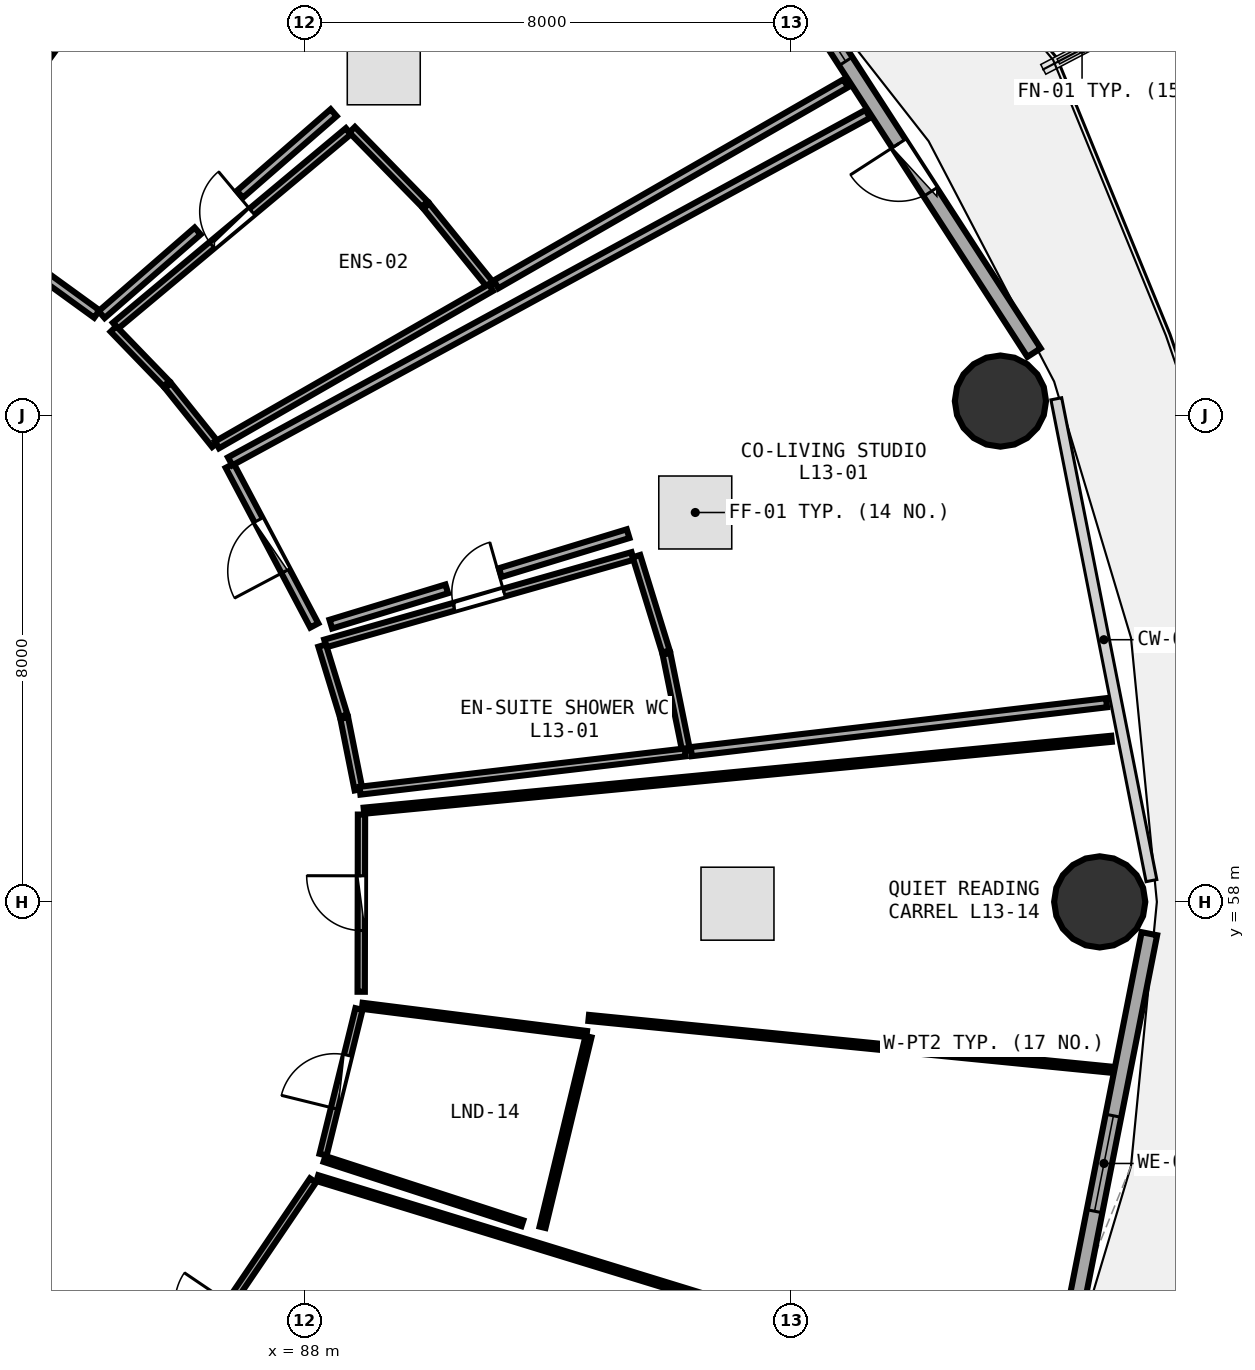
"""IFC4 building model, lengths in metres.
Left out: names, types, materials, properties, quantities, classifications, styles, units other than length and angle.
Written with IfcOpenShell. Run it as: python <this file> out.ifc"""

import sys

from ifc_helpers import new_model, si_unit, direction, frame, frame_2d, origin, origin_2d, place, context, subcontext, project, spatial, rectangle, circle, extrude, element, fill, save


model = new_model("IFC4")
c1 = context("Model", 3, precision=1e-05, world=origin(), true_north=direction((0.0, 1.0)))
c2 = subcontext(c1, "Body", "Model", "MODEL_VIEW")
j1 = project(units=[si_unit("LENGTHUNIT", "METRE"), si_unit("PLANEANGLEUNIT", "RADIAN")], contexts=[c1])
p1 = place(None, origin())
s1 = spatial("IfcSite", under=j1, at=p1, CompositionType="ELEMENT")
p2 = place(p1, origin())
s2 = spatial("IfcBuilding", under=s1, at=p2, CompositionType="ELEMENT")
p3 = place(p2, frame((0.0, 0.0, 52.5)))
s3 = spatial("IfcBuildingStorey", under=s2, at=p3, CompositionType="ELEMENT", Elevation=52.5)
for number, where, z_axis, x_axis in (
    (1, (101.08, 58.0, 0.0), (0.0, 0.0, 1.0), (1.0, 0.0, 0.0)),
    (2, (99.447, 66.236, 0.0), (0.0, 0.0, 1.0), (1.0, 0.0, 0.0)),
):
    element("IfcColumn", number, at=place(p3, frame(where, z_axis=z_axis, x_axis=x_axis)), inside=s3, PredefinedType="COLUMN", context=c2, shape_type="SweptSolid", body=[
        extrude(circle(Radius=0.75, at=origin_2d()), origin(), (0.0, 0.0, 1.0), 3.75),
    ])
p4 = place(p3, frame((99.999, 67.033, 0.0), z_axis=(0.0, 0.0, 1.0), x_axis=(-0.543005114258, 0.839729388488, 0.0)))
e3 = element("IfcWall", 3, at=p4, inside=s3, PredefinedType="SOLIDWALL", context=c2, shape_type="SweptSolid", body=[
    extrude(rectangle(XDim=7.938, YDim=0.26, at=frame_2d((3.969, 0.0))), origin(), (0.0, 0.0, 1.0), 3.475),
])
p5 = place(p4, frame((3.144, 0.0, 0.0)))
e4 = element("IfcOpeningElement", 4, at=p5, cuts=e3, PredefinedType="OPENING", context=c2, shape_type="SweptSolid", body=[
    extrude(rectangle(XDim=0.95, YDim=2.1, at=frame_2d((0.475, 1.05))), frame((0.0, 0.14, 0.0), z_axis=(0.0, -1.0, 0.0), x_axis=(1.0, 0.0, 0.0)), (0.0, 0.0, 1.0), 0.28),
])
p6 = place(p4, frame((5.704, 0.0, 0.85)))
e5 = element("IfcOpeningElement", 5, at=p6, cuts=e3, PredefinedType="OPENING", context=c2, shape_type="SweptSolid", body=[
    extrude(rectangle(XDim=1.2, YDim=1.45, at=frame_2d((0.6, 0.725))), frame((0.0, 0.14, 0.0), z_axis=(0.0, -1.0, 0.0), x_axis=(1.0, 0.0, 0.0)), (0.0, 0.0, 1.0), 0.28),
])
p7 = place(p3, frame((100.404, 49.92, 0.0), z_axis=(0.0, 0.0, 1.0), x_axis=(0.193726159581, 0.98105564322, 0.0)))
e6 = element("IfcWall", 6, at=p7, inside=s3, PredefinedType="SOLIDWALL", context=c2, shape_type="SweptSolid", body=[
    extrude(rectangle(XDim=7.703, YDim=0.26, at=frame_2d((3.851, 0.0))), origin(), (0.0, 0.0, 1.0), 3.475),
])
p8 = place(p7, frame((3.051, 0.0, 0.85)))
e7 = element("IfcOpeningElement", 7, at=p8, cuts=e6, PredefinedType="OPENING", context=c2, shape_type="SweptSolid", body=[
    extrude(rectangle(XDim=1.6, YDim=1.45, at=frame_2d((0.8, 0.725))), frame((0.0, 0.14, 0.0), z_axis=(0.0, -1.0, 0.0), x_axis=(1.0, 0.0, 0.0)), (0.0, 0.0, 1.0), 0.28),
])
p9 = place(p3, frame((88.344, 62.25, 0.0), z_axis=(0.0, 0.0, 1.0), x_axis=(0.961805744602, 0.273732916636, 0.0)))
e8 = element("IfcWall", 8, at=p9, inside=s3, PredefinedType="PLUMBINGWALL", context=c2, shape_type="SweptSolid", body=[
    extrude(rectangle(XDim=5.254, YDim=0.13, at=frame_2d((2.627, 0.0))), origin(), (0.0, 0.0, 1.0), 3.175),
])
p10 = place(p9, frame((2.197, 0.0, 0.0)))
e9 = element("IfcOpeningElement", 9, at=p10, cuts=e8, PredefinedType="OPENING", context=c2, shape_type="SweptSolid", body=[
    extrude(rectangle(XDim=0.86, YDim=2.05, at=frame_2d((0.43, 1.025))), frame((0.0, 0.075, 0.0), z_axis=(0.0, -1.0, 0.0), x_axis=(1.0, 0.0, 0.0)), (0.0, 0.0, 1.0), 0.15),
])
p11 = place(p3, frame((88.162, 62.546, 0.0), z_axis=(0.0, 0.0, 1.0), x_axis=(-0.467566881753, 0.883957697567, 0.0)))
e10 = element("IfcWall", 10, at=p11, inside=s3, PredefinedType="PARTITIONING", context=c2, shape_type="SweptSolid", body=[
    extrude(rectangle(XDim=2.972, YDim=0.15, at=frame_2d((1.486, 0.0))), origin(), (0.0, 0.0, 1.0), 2.875),
])
p12 = place(p11, frame((1.011, 0.0, 0.0)))
e11 = element("IfcOpeningElement", 11, at=p12, cuts=e10, PredefinedType="OPENING", context=c2, shape_type="SweptSolid", body=[
    extrude(rectangle(XDim=0.95, YDim=2.08, at=frame_2d((0.475, 1.04))), frame((0.0, 0.085, 0.0), z_axis=(0.0, -1.0, 0.0), x_axis=(1.0, 0.0, 0.0)), (0.0, 0.0, 1.0), 0.17),
])
p13 = place(p3, frame((84.892, 67.475, 0.0), z_axis=(0.0, 0.0, 1.0), x_axis=(0.767551433238, 0.64098736129, 0.0)))
e12 = element("IfcWall", 12, at=p13, inside=s3, PredefinedType="PLUMBINGWALL", context=c2, shape_type="SweptSolid", body=[
    extrude(rectangle(XDim=4.992, YDim=0.13, at=frame_2d((2.496, 0.0))), origin(), (0.0, 0.0, 1.0), 3.175),
])
p14 = place(p13, frame((2.066, 0.0, 0.0)))
e13 = element("IfcOpeningElement", 13, at=p14, cuts=e12, PredefinedType="OPENING", context=c2, shape_type="SweptSolid", body=[
    extrude(rectangle(XDim=0.86, YDim=2.05, at=frame_2d((0.43, 1.025))), frame((0.0, 0.075, 0.0), z_axis=(0.0, -1.0, 0.0), x_axis=(1.0, 0.0, 0.0)), (0.0, 0.0, 1.0), 0.15),
])
p15 = place(p3, frame((84.586, 67.667, 0.0), z_axis=(0.0, 0.0, 1.0), x_axis=(-0.80951419377, 0.587100306664, 0.0)))
e14 = element("IfcWall", 14, at=p15, inside=s3, PredefinedType="PARTITIONING", context=c2, shape_type="SweptSolid", body=[
    extrude(rectangle(XDim=3.104, YDim=0.15, at=frame_2d((1.552, 0.0))), origin(), (0.0, 0.0, 1.0), 2.875),
])
p16 = place(p15, frame((1.077, 0.0, 0.0)))
e15 = element("IfcOpeningElement", 15, at=p16, cuts=e14, PredefinedType="OPENING", context=c2, shape_type="SweptSolid", body=[
    extrude(rectangle(XDim=0.95, YDim=2.08, at=frame_2d((0.475, 1.04))), frame((0.0, 0.085, 0.0), z_axis=(0.0, -1.0, 0.0), x_axis=(1.0, 0.0, 0.0)), (0.0, 0.0, 1.0), 0.17),
])
p17 = place(p3, frame((84.895, 48.628, 0.0), z_axis=(0.0, 0.0, 1.0), x_axis=(0.560933949984, 0.827860558159, 0.0)))
e16 = element("IfcWall", 16, at=p17, inside=s3, PredefinedType="PARTITIONING", context=c2, shape_type="SweptSolid", body=[
    extrude(rectangle(XDim=5.788, YDim=0.12, at=frame_2d((2.894, 0.0))), origin(), (0.0, 0.0, 1.0), 2.875),
])
p18 = place(p17, frame((2.444, 0.0, 0.0)))
e17 = element("IfcOpeningElement", 17, at=p18, cuts=e16, PredefinedType="OPENING", context=c2, shape_type="SweptSolid", body=[
    extrude(rectangle(XDim=0.9, YDim=2.08, at=frame_2d((0.45, 1.04))), frame((0.0, 0.07, 0.0), z_axis=(0.0, -1.0, 0.0), x_axis=(1.0, 0.0, 0.0)), (0.0, 0.0, 1.0), 0.14),
])
p19 = place(p3, frame((88.307, 53.843, 0.0), z_axis=(0.0, 0.0, 1.0), x_axis=(0.239366536705, 0.970929277088, 0.0)))
e18 = element("IfcWall", 18, at=p19, inside=s3, PredefinedType="PARTITIONING", context=c2, shape_type="SweptSolid", body=[
    extrude(rectangle(XDim=2.466, YDim=0.12, at=frame_2d((1.233, 0.0))), origin(), (0.0, 0.0, 1.0), 3.48),
])
p20 = place(p19, frame((0.783, 0.0, 0.0)))
e19 = element("IfcOpeningElement", 19, at=p20, cuts=e18, PredefinedType="OPENING", context=c2, shape_type="SweptSolid", body=[
    extrude(rectangle(XDim=0.9, YDim=2.08, at=frame_2d((0.45, 1.04))), frame((0.0, 0.07, 0.0), z_axis=(0.0, -1.0, 0.0), x_axis=(1.0, 0.0, 0.0)), (0.0, 0.0, 1.0), 0.14),
])
p21 = place(p3, frame((88.934, 56.522, 0.0), z_axis=(0.0, 0.0, 1.0), x_axis=(0.001675600865, 0.99999859618, 0.0)))
e20 = element("IfcWall", 20, at=p21, inside=s3, PredefinedType="PARTITIONING", context=c2, shape_type="SweptSolid", body=[
    extrude(rectangle(XDim=2.914, YDim=0.12, at=frame_2d((1.457, 0.0))), origin(), (0.0, 0.0, 1.0), 2.875),
])
p22 = place(p21, frame((1.007, 0.0, 0.0)))
e21 = element("IfcOpeningElement", 21, at=p22, cuts=e20, PredefinedType="OPENING", context=c2, shape_type="SweptSolid", body=[
    extrude(rectangle(XDim=0.9, YDim=2.08, at=frame_2d((0.45, 1.04))), frame((0.0, 0.07, 0.0), z_axis=(0.0, -1.0, 0.0), x_axis=(1.0, 0.0, 0.0)), (0.0, 0.0, 1.0), 0.14),
])
p23 = place(p3, frame((88.89, 59.846, 0.0), z_axis=(0.0, 0.0, 1.0), x_axis=(-0.195959765133, 0.980611936726, 0.0)))
e22 = element("IfcWall", 22, at=p23, inside=s3, PredefinedType="PLUMBINGWALL", context=c2, shape_type="SweptSolid", body=[
    extrude(rectangle(XDim=1.201, YDim=0.13, at=frame_2d((0.601, 0.0))), origin(), (0.0, 0.0, 1.0), 3.48),
])
p24 = place(p3, frame((88.645, 61.062, 0.0), z_axis=(0.0, 0.0, 1.0), x_axis=(-0.292804953119, 0.956172191307, 0.0)))
e23 = element("IfcWall", 23, at=p24, inside=s3, PredefinedType="PLUMBINGWALL", context=c2, shape_type="SweptSolid", body=[
    extrude(rectangle(XDim=1.206, YDim=0.13, at=frame_2d((0.603, 0.0))), origin(), (0.0, 0.0, 1.0), 3.48),
])
p25 = place(p3, frame((93.461, 63.686, 0.0), z_axis=(0.0, 0.0, 1.0), x_axis=(0.295079059694, -0.955472840289, 0.0)))
e24 = element("IfcWall", 24, at=p25, inside=s3, PredefinedType="PLUMBINGWALL", context=c2, shape_type="SweptSolid", body=[
    extrude(rectangle(XDim=1.641, YDim=0.13, at=frame_2d((0.82, 0.0))), origin(), (0.0, 0.0, 1.0), 3.48),
])
p26 = place(p3, frame((93.955, 62.079, 0.0), z_axis=(0.0, 0.0, 1.0), x_axis=(0.198619685617, -0.980076640108, 0.0)))
e25 = element("IfcWall", 25, at=p26, inside=s3, PredefinedType="PLUMBINGWALL", context=c2, shape_type="SweptSolid", body=[
    extrude(rectangle(XDim=1.631, YDim=0.13, at=frame_2d((0.815, 0.0))), origin(), (0.0, 0.0, 1.0), 3.48),
])
p27 = place(p3, frame((94.263, 60.459, 0.0), z_axis=(0.0, 0.0, 1.0), x_axis=(-0.993128310231, -0.117030591804, 0.0)))
e26 = element("IfcWall", 26, at=p27, inside=s3, PredefinedType="PLUMBINGWALL", context=c2, shape_type="SweptSolid", body=[
    extrude(rectangle(XDim=5.386, YDim=0.13, at=frame_2d((2.693, 0.0))), origin(), (0.0, 0.0, 1.0), 3.175),
])
p28 = place(p3, frame((86.779, 65.245, 0.0), z_axis=(0.0, 0.0, 1.0), x_axis=(0.878114235828, 0.478451030761, 0.0)))
e27 = element("IfcWall", 27, at=p28, inside=s3, PredefinedType="PARTITIONING", context=c2, shape_type="SweptSolid", body=[
    extrude(rectangle(XDim=11.942, YDim=0.15, at=frame_2d((5.971, 0.0))), origin(), (0.0, 0.0, 1.0), 2.875),
])
p29 = place(p3, frame((101.192, 61.275, 0.0), z_axis=(0.0, 0.0, 1.0), x_axis=(-0.993130233211, -0.117014272133, 0.0)))
e28 = element("IfcWall", 28, at=p29, inside=s3, PredefinedType="PARTITIONING", context=c2, shape_type="SweptSolid", body=[
    extrude(rectangle(XDim=6.877, YDim=0.15, at=frame_2d((3.438, 0.0))), origin(), (0.0, 0.0, 1.0), 2.875),
])
p30 = place(p3, frame((93.324, 64.055, 0.0), z_axis=(0.0, 0.0, 1.0), x_axis=(-0.956656385618, -0.291219092533, 0.0)))
e29 = element("IfcWall", 29, at=p30, inside=s3, PredefinedType="PARTITIONING", context=c2, shape_type="SweptSolid", body=[
    extrude(rectangle(XDim=2.197, YDim=0.15, at=frame_2d((1.099, 0.0))), origin(), (0.0, 0.0, 1.0), 3.175),
])
p31 = place(p3, frame((90.341, 63.148, 0.0), z_axis=(0.0, 0.0, 1.0), x_axis=(-0.956672396934, -0.291166490078, 0.0)))
e30 = element("IfcWall", 30, at=p31, inside=s3, PredefinedType="PARTITIONING", context=c2, shape_type="SweptSolid", body=[
    extrude(rectangle(XDim=1.993, YDim=0.15, at=frame_2d((0.997, 0.0))), origin(), (0.0, 0.0, 1.0), 3.235),
])
p32 = place(p3, frame((86.533, 65.521, 0.0), z_axis=(0.0, 0.0, 1.0), x_axis=(-0.625509784914, 0.780216321912, 0.0)))
e31 = element("IfcWall", 31, at=p32, inside=s3, PredefinedType="PLUMBINGWALL", context=c2, shape_type="SweptSolid", body=[
    extrude(rectangle(XDim=1.242, YDim=0.13, at=frame_2d((0.621, 0.0))), origin(), (0.0, 0.0, 1.0), 2.875),
])
p33 = place(p3, frame((85.73, 66.521, 0.0), z_axis=(0.0, 0.0, 1.0), x_axis=(-0.694622338853, 0.719374593913, 0.0)))
e32 = element("IfcWall", 32, at=p33, inside=s3, PredefinedType="PLUMBINGWALL", context=c2, shape_type="SweptSolid", body=[
    extrude(rectangle(XDim=1.253, YDim=0.13, at=frame_2d((0.626, 0.0))), origin(), (0.0, 0.0, 1.0), 2.875),
])
p34 = place(p3, frame((88.784, 70.699, 0.0), z_axis=(0.0, 0.0, 1.0), x_axis=(0.698493231478, -0.715616661055, 0.0)))
e33 = element("IfcWall", 33, at=p34, inside=s3, PredefinedType="PLUMBINGWALL", context=c2, shape_type="SweptSolid", body=[
    extrude(rectangle(XDim=1.711, YDim=0.13, at=frame_2d((0.855, 0.0))), origin(), (0.0, 0.0, 1.0), 2.875),
])
p35 = place(p3, frame((90.006, 69.445, 0.0), z_axis=(0.0, 0.0, 1.0), x_axis=(0.629707963092, -0.776831951723, 0.0)))
e34 = element("IfcWall", 34, at=p35, inside=s3, PredefinedType="PLUMBINGWALL", context=c2, shape_type="SweptSolid", body=[
    extrude(rectangle(XDim=1.694, YDim=0.13, at=frame_2d((0.847, 0.0))), origin(), (0.0, 0.0, 1.0), 3.175),
])
p36 = place(p3, frame((91.068, 68.103, 0.0), z_axis=(0.0, 0.0, 1.0), x_axis=(-0.867165143158, -0.498020696851, 0.0)))
e35 = element("IfcWall", 35, at=p36, inside=s3, PredefinedType="PLUMBINGWALL", context=c2, shape_type="SweptSolid", body=[
    extrude(rectangle(XDim=5.194, YDim=0.13, at=frame_2d((2.597, 0.0))), origin(), (0.0, 0.0, 1.0), 2.875),
])
p37 = place(p3, frame((82.049, 69.557, 0.0), z_axis=(0.0, 0.0, 1.0), x_axis=(0.586718941426, 0.809790641939, 0.0)))
e36 = element("IfcWall", 36, at=p37, inside=s3, PredefinedType="PARTITIONING", context=c2, shape_type="SweptSolid", body=[
    extrude(rectangle(XDim=11.249, YDim=0.15, at=frame_2d((5.625, 0.0))), origin(), (0.0, 0.0, 1.0), 2.875),
])
p38 = place(p3, frame((96.903, 71.461, 0.0), z_axis=(0.0, 0.0, 1.0), x_axis=(-0.866924194656, -0.498440007142, 0.0)))
e37 = element("IfcWall", 37, at=p38, inside=s3, PredefinedType="PARTITIONING", context=c2, shape_type="SweptSolid", body=[
    extrude(rectangle(XDim=6.634, YDim=0.15, at=frame_2d((3.317, 0.0))), origin(), (0.0, 0.0, 1.0), 2.875),
])
p39 = place(p3, frame((88.481, 70.979, 0.0), z_axis=(0.0, 0.0, 1.0), x_axis=(-0.754356172394, -0.656465357176, 0.0)))
e38 = element("IfcWall", 38, at=p39, inside=s3, PredefinedType="PARTITIONING", context=c2, shape_type="SweptSolid", body=[
    extrude(rectangle(XDim=2.045, YDim=0.15, at=frame_2d((1.022, 0.0))), origin(), (0.0, 0.0, 1.0), 3.175),
])
p40 = place(p3, frame((86.244, 69.032, 0.0), z_axis=(0.0, 0.0, 1.0), x_axis=(-0.754351792987, -0.656470389597, 0.0)))
e39 = element("IfcWall", 39, at=p40, inside=s3, PredefinedType="PARTITIONING", context=c2, shape_type="SweptSolid", body=[
    extrude(rectangle(XDim=2.093, YDim=0.15, at=frame_2d((1.046, 0.0))), origin(), (0.0, 0.0, 1.0), 3.235),
])
p41 = place(p3, frame((84.491, 73.746, 0.0), z_axis=(0.0, 0.0, 1.0), x_axis=(-0.566068810651, -0.824357993597, 0.0)))
e40 = element("IfcWall", 40, at=p41, inside=s3, PredefinedType="PLUMBINGWALL", context=c2, shape_type="SweptSolid", body=[
    extrude(rectangle(XDim=4.889, YDim=0.13, at=frame_2d((2.444, 0.0))), origin(), (0.0, 0.0, 1.0), 3.175),
])
p42 = place(p3, frame((88.213, 53.457, 0.0), z_axis=(0.0, 0.0, 1.0), x_axis=(0.955941269752, -0.29355798198, 0.0)))
e41 = element("IfcWall", 41, at=p42, inside=s3, PredefinedType="PARTITIONING", context=c2, shape_type="SweptSolid", body=[
    extrude(rectangle(XDim=11.083, YDim=0.1, at=frame_2d((5.542, 0.0))), origin(), (0.0, 0.0, 1.0), 3.175),
])
p43 = place(p3, frame((88.952, 56.291, 0.0), z_axis=(0.0, 0.0, 1.0), x_axis=(0.992185717147, -0.124769798789, 0.0)))
e42 = element("IfcWall", 42, at=p43, inside=s3, PredefinedType="PARTITIONING", context=c2, shape_type="SweptSolid", body=[
    extrude(rectangle(XDim=3.72, YDim=0.1, at=frame_2d((1.86, 0.0))), origin(), (0.0, 0.0, 1.0), 3.235),
])
p44 = place(p3, frame((92.673, 55.783, 0.0), z_axis=(0.0, 0.0, 1.0), x_axis=(-0.234509762348, -0.97211376462, 0.0)))
e43 = element("IfcWall", 43, at=p44, inside=s3, PredefinedType="PARTITIONING", context=c2, shape_type="SweptSolid", body=[
    extrude(rectangle(XDim=3.224, YDim=0.1, at=frame_2d((1.612, 0.0))), origin(), (0.0, 0.0, 1.0), 3.48),
])
p45 = place(p3, frame((91.585, 52.715, 0.0), z_axis=(0.0, 0.0, 1.0), x_axis=(-0.950990540972, 0.309219971834, 0.0)))
e44 = element("IfcWall", 44, at=p45, inside=s3, PredefinedType="PARTITIONING", context=c2, shape_type="SweptSolid", body=[
    extrude(rectangle(XDim=3.422, YDim=0.1, at=frame_2d((1.711, 0.0))), origin(), (0.0, 0.0, 1.0), 3.235),
])
p46 = place(p3, frame((88.979, 59.5, 0.0), z_axis=(0.0, 0.0, 1.0), x_axis=(0.995408087514, 0.095722198638, 0.0)))
e45 = element("IfcWall", 45, at=p46, inside=s3, PredefinedType="PARTITIONING", context=c2, shape_type="SweptSolid", body=[
    extrude(rectangle(XDim=12.352, YDim=0.1, at=frame_2d((6.176, 0.0))), origin(), (0.0, 0.0, 1.0), 2.875),
])
p47 = place(p3, frame((101.264, 55.241, 0.0), z_axis=(0.0, 0.0, 1.0), x_axis=(-0.995131682946, 0.098554216532, 0.0)))
e46 = element("IfcWall", 46, at=p47, inside=s3, PredefinedType="PARTITIONING", context=c2, shape_type="SweptSolid", body=[
    extrude(rectangle(XDim=8.631, YDim=0.1, at=frame_2d((4.315, 0.0))), origin(), (0.0, 0.0, 1.0), 2.875),
])
p48 = place(p5, frame((0.95, 0.0, 0.0), z_axis=(0.0, 0.0, 1.0), x_axis=(-1.0, 0.0, 0.0)))
e47 = element("IfcDoor", 47, at=p48, inside=s3, OperationType="SINGLE_SWING_LEFT", PredefinedType="DOOR", context=c2, shape_type="SweptSolid", body=[
    extrude(rectangle(XDim=0.95, YDim=2.1, at=frame_2d((0.475, 1.05))), frame((0.0, 0.025, 0.0), z_axis=(0.0, -1.0, 0.0), x_axis=(1.0, 0.0, 0.0)), (0.0, 0.0, 1.0), 0.05),
])
fill(e4, e47)
p49 = place(p6, origin())
e48 = element("IfcWindow", 48, at=p49, inside=s3, PartitioningType="SINGLE_PANEL", PredefinedType="WINDOW", context=c2, shape_type="SweptSolid", body=[
    extrude(rectangle(XDim=1.2, YDim=1.45, at=frame_2d((0.6, 0.725))), frame((0.0, 0.03, 0.0), z_axis=(0.0, -1.0, 0.0), x_axis=(1.0, 0.0, 0.0)), (0.0, 0.0, 1.0), 0.06),
])
fill(e5, e48)
p50 = place(p8, origin())
e49 = element("IfcWindow", 49, at=p50, inside=s3, PartitioningType="SINGLE_PANEL", PredefinedType="WINDOW", context=c2, shape_type="SweptSolid", body=[
    extrude(rectangle(XDim=1.6, YDim=1.45, at=frame_2d((0.8, 0.725))), frame((0.0, 0.03, 0.0), z_axis=(0.0, -1.0, 0.0), x_axis=(1.0, 0.0, 0.0)), (0.0, 0.0, 1.0), 0.06),
])
fill(e7, e49)
p51 = place(p10, origin())
e50 = element("IfcDoor", 50, at=p51, inside=s3, OperationType="SINGLE_SWING_RIGHT", PredefinedType="DOOR", context=c2, shape_type="SweptSolid", body=[
    extrude(rectangle(XDim=0.86, YDim=2.05, at=frame_2d((0.43, 1.025))), frame((0.0, 0.025, 0.0), z_axis=(0.0, -1.0, 0.0), x_axis=(1.0, 0.0, 0.0)), (0.0, 0.0, 1.0), 0.05),
])
fill(e9, e50)
p52 = place(p12, origin())
e51 = element("IfcDoor", 51, at=p52, inside=s3, OperationType="SINGLE_SWING_LEFT", PredefinedType="DOOR", context=c2, shape_type="SweptSolid", body=[
    extrude(rectangle(XDim=0.95, YDim=2.08, at=frame_2d((0.475, 1.04))), frame((0.0, 0.025, 0.0), z_axis=(0.0, -1.0, 0.0), x_axis=(1.0, 0.0, 0.0)), (0.0, 0.0, 1.0), 0.05),
])
fill(e11, e51)
p53 = place(p14, origin())
e52 = element("IfcDoor", 52, at=p53, inside=s3, OperationType="SINGLE_SWING_RIGHT", PredefinedType="DOOR", context=c2, shape_type="SweptSolid", body=[
    extrude(rectangle(XDim=0.86, YDim=2.05, at=frame_2d((0.43, 1.025))), frame((0.0, 0.025, 0.0), z_axis=(0.0, -1.0, 0.0), x_axis=(1.0, 0.0, 0.0)), (0.0, 0.0, 1.0), 0.05),
])
fill(e13, e52)
p54 = place(p20, origin())
e53 = element("IfcDoor", 53, at=p54, inside=s3, OperationType="SINGLE_SWING_LEFT", PredefinedType="DOOR", context=c2, shape_type="SweptSolid", body=[
    extrude(rectangle(XDim=0.9, YDim=2.08, at=frame_2d((0.45, 1.04))), frame((0.0, 0.025, 0.0), z_axis=(0.0, -1.0, 0.0), x_axis=(1.0, 0.0, 0.0)), (0.0, 0.0, 1.0), 0.05),
])
fill(e19, e53)
p55 = place(p22, origin())
e54 = element("IfcDoor", 54, at=p55, inside=s3, OperationType="SINGLE_SWING_RIGHT", PredefinedType="DOOR", context=c2, shape_type="SweptSolid", body=[
    extrude(rectangle(XDim=0.9, YDim=2.08, at=frame_2d((0.45, 1.04))), frame((0.0, 0.025, 0.0), z_axis=(0.0, -1.0, 0.0), x_axis=(1.0, 0.0, 0.0)), (0.0, 0.0, 1.0), 0.05),
])
fill(e21, e54)
save(model, sys.argv[1])
